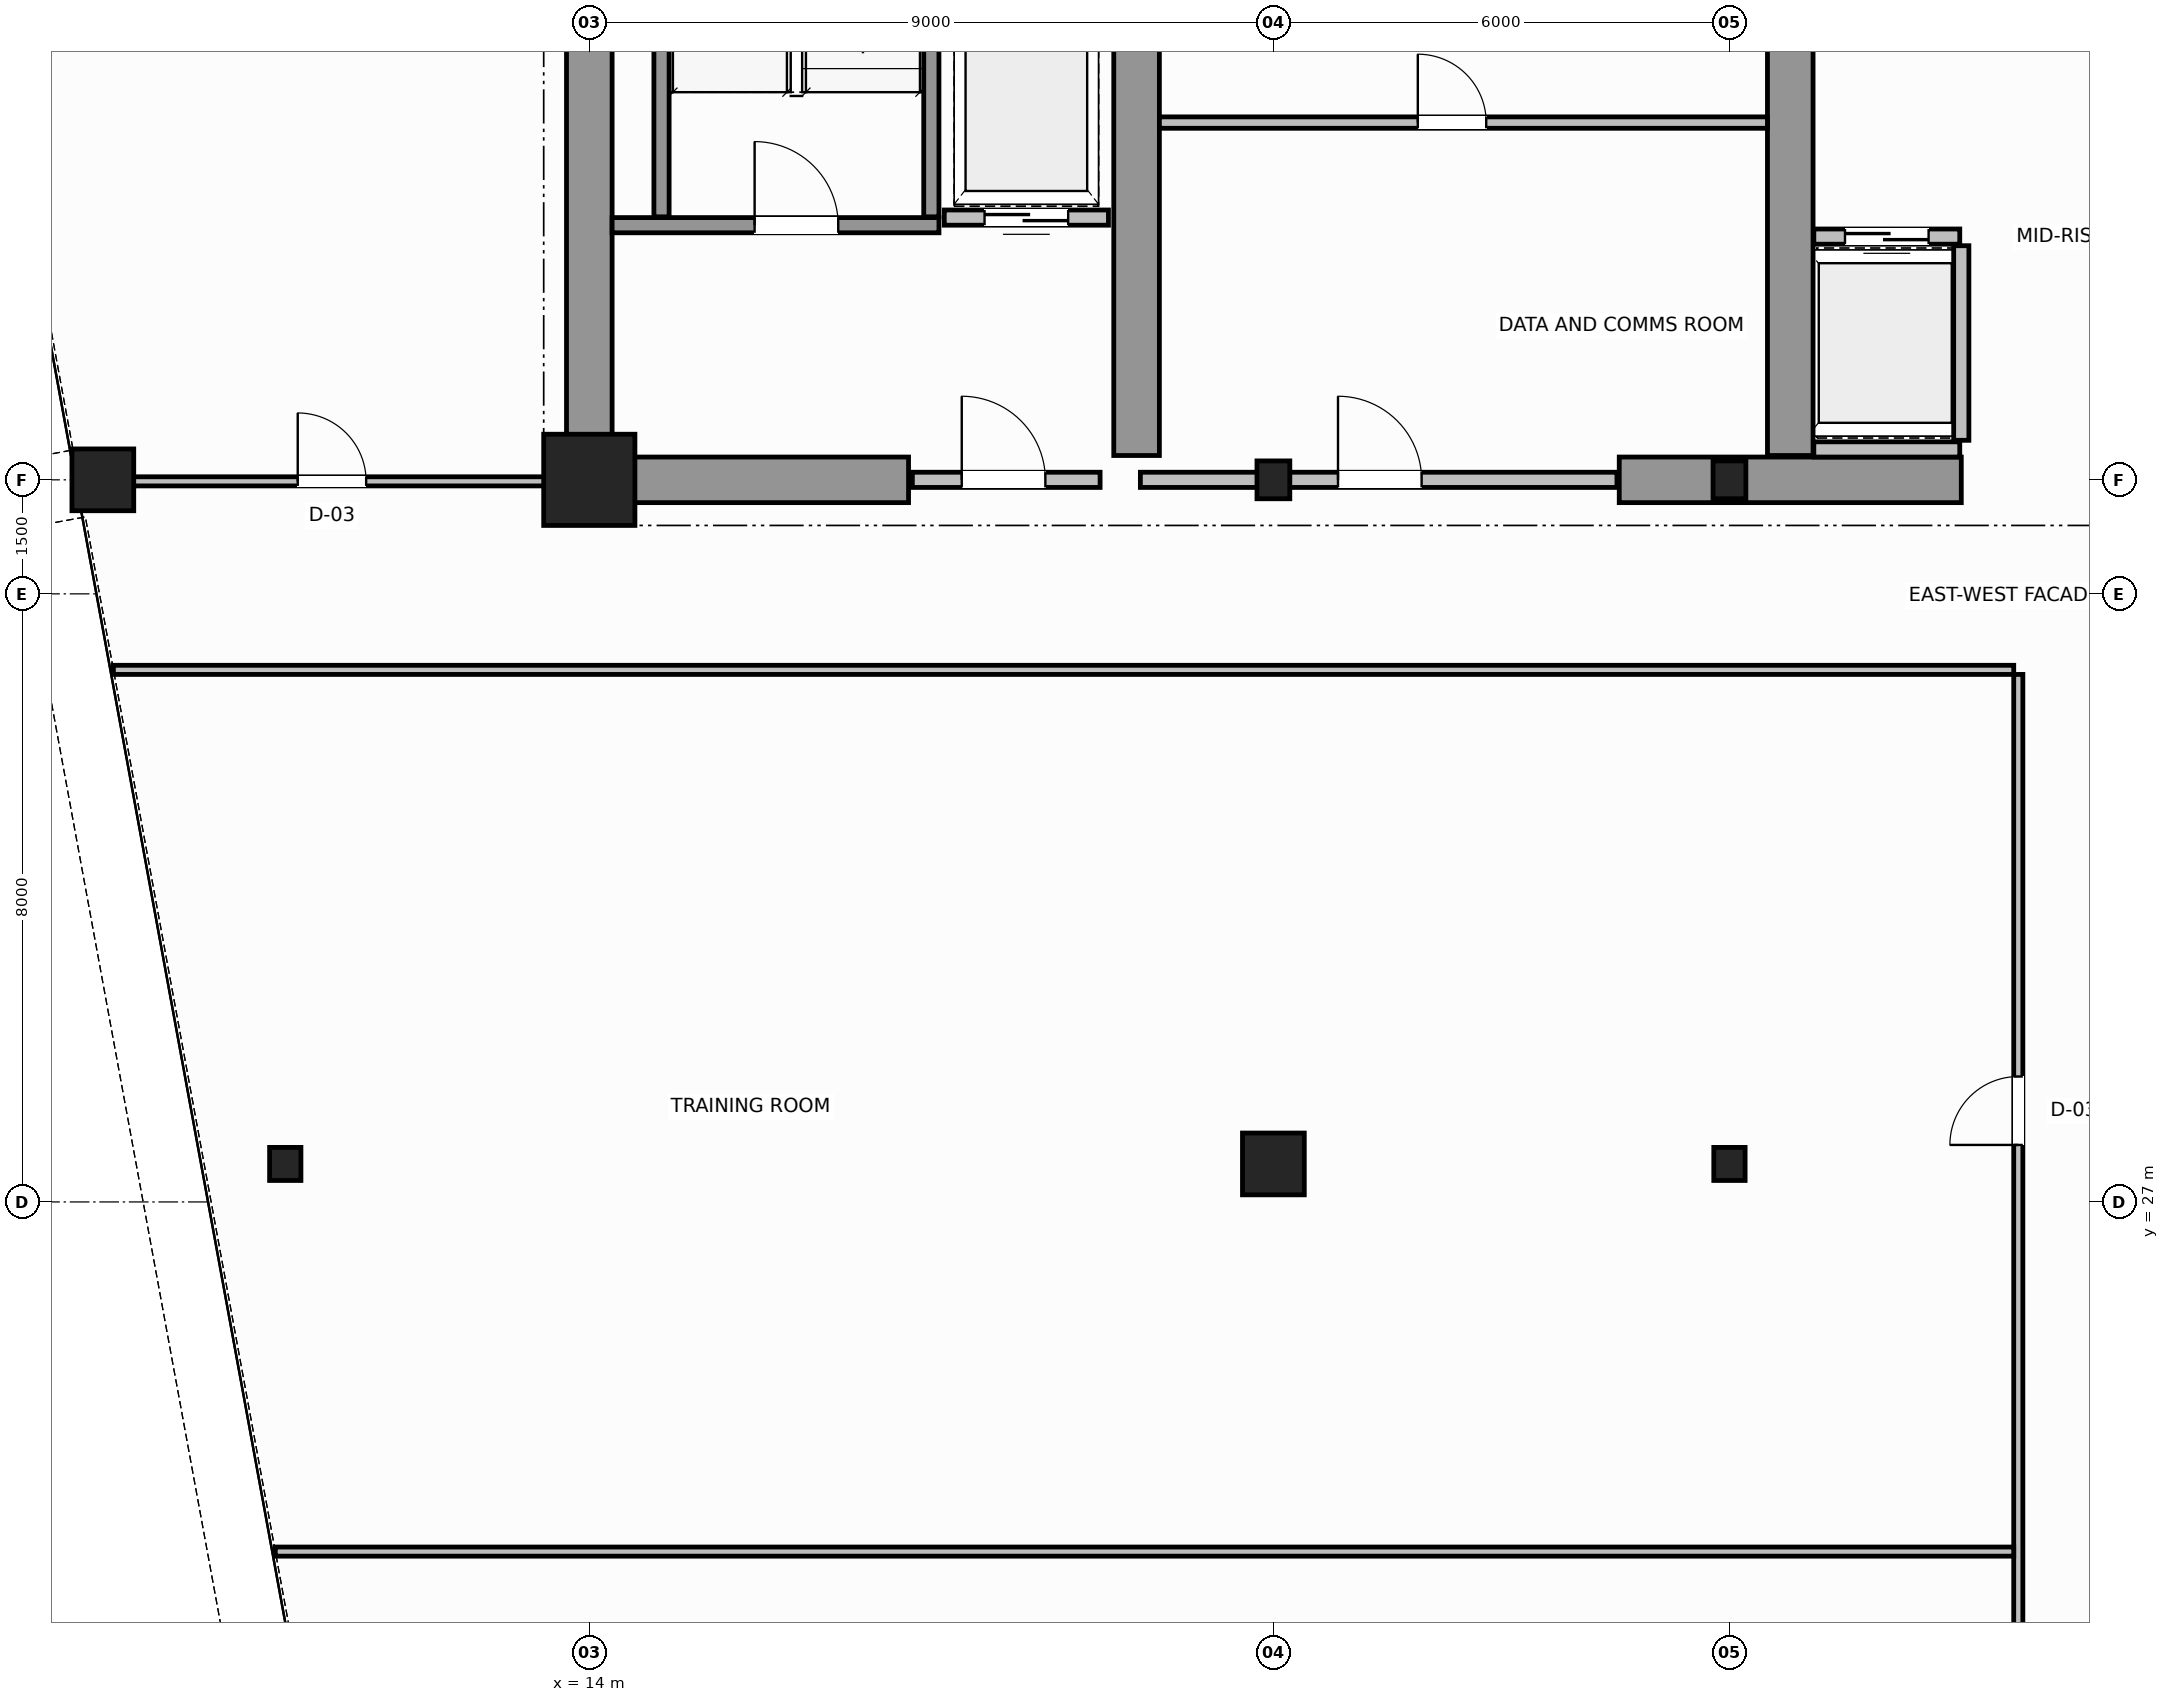
"""IFC4 building model, lengths in metres.
Left out: names, types, materials, properties, quantities, classifications, styles, units other than length and angle.
Written with IfcOpenShell. Run it as: python <this file> out.ifc"""

import sys

from ifc_helpers import new_model, si_unit, direction, frame, frame_2d, origin, origin_2d, place, context, subcontext, project, spatial, rectangle, hollow_circle, i_section, extrude, source, transform, mapped, element, fill, save


model = new_model("IFC4")
c1 = context("Model", 3, precision=1e-05, world=origin(), true_north=direction((0.0, 1.0)))
c2 = subcontext(c1, "Body", "Model", "MODEL_VIEW")
j1 = project(units=[si_unit("LENGTHUNIT", "METRE"), si_unit("PLANEANGLEUNIT", "RADIAN")], contexts=[c1])
p1 = place(None, origin())
s1 = spatial("IfcSite", under=j1, at=p1, CompositionType="ELEMENT")
p2 = place(p1, origin())
s2 = spatial("IfcBuilding", under=s1, at=p2, CompositionType="ELEMENT")
p3 = place(p2, frame((0.0, 0.0, 191.8)))
s3 = spatial("IfcBuildingStorey", under=s2, at=p3, CompositionType="ELEMENT", Elevation=191.8)
m1 = source(origin(), c2, "Body", "SweptSolid", [
    extrude(rectangle(XDim=1.2, YDim=1.2, at=origin_2d()), origin(), (0.0, 0.0, 1.0), 3.8),
])
p4 = place(p3, frame((14.0, 36.5, 0.0), z_axis=(0.0, 0.0, 1.0), x_axis=(1.0, 0.0, 0.0)))
e1 = element("IfcColumn", 1, at=p4, inside=s3, PredefinedType="COLUMN", context=c2, shape_type="MappedRepresentation", body=[
    mapped(m1, transform((0.0, 0.0, 0.0), scale=1.0)),
])
m2 = source(origin(), c2, "Body", "SweptSolid", [
    extrude(i_section(OverallWidth=0.432, OverallDepth=0.498, WebThickness=0.055, FlangeThickness=0.068, FilletRadius=0.015, at=origin_2d()), origin(), (0.0, 0.0, 1.0), 3.8),
])
for number, where, z_axis, x_axis in (
    (2, (23.0, 36.5, 0.0), (0.0, 0.0, 1.0), (1.0, 0.0, 0.0)),
    (3, (29.0, 36.5, 0.0), (0.0, 0.0, 1.0), (1.0, 0.0, 0.0)),
):
    element("IfcColumn", number, at=place(p3, frame(where, z_axis=z_axis, x_axis=x_axis)), inside=s3, PredefinedType="COLUMN", context=c2, shape_type="MappedRepresentation", body=[
        mapped(m2, transform((0.0, 0.0, 0.0), scale=1.0)),
    ])
m3 = source(origin(), c2, "Body", "SweptSolid", [
    extrude(hollow_circle(Radius=0.406, WallThickness=0.04, at=origin_2d()), origin(), (0.0, 0.0, 1.0), 3.8),
])
p5 = place(p3, frame((7.6, 36.5, 0.0), z_axis=(0.0, 0.0, 1.0), x_axis=(1.0, 0.0, 0.0)))
e4 = element("IfcColumn", 4, at=p5, inside=s3, PredefinedType="COLUMN", context=c2, shape_type="MappedRepresentation", body=[
    mapped(m3, transform((0.0, 0.0, 0.0), scale=1.0)),
])
m4 = source(origin(), c2, "Body", "SweptSolid", [
    extrude(i_section(OverallWidth=0.412, OverallDepth=0.435, WebThickness=0.036, FlangeThickness=0.05, FilletRadius=0.015, at=origin_2d()), origin(), (0.0, 0.0, 1.0), 3.8),
])
p6 = place(p3, frame((10.0, 27.5, 0.0), z_axis=(0.0, 0.0, 1.0), x_axis=(1.0, 0.0, 0.0)))
e5 = element("IfcColumn", 5, at=p6, inside=s3, PredefinedType="COLUMN", context=c2, shape_type="MappedRepresentation", body=[
    mapped(m4, transform((0.0, 0.0, 0.0), scale=1.0)),
])
p7 = place(p3, frame((23.0, 27.5, 0.0), z_axis=(0.0, 0.0, 1.0), x_axis=(1.0, 0.0, 0.0)))
e6 = element("IfcColumn", 6, at=p7, inside=s3, PredefinedType="COLUMN", context=c2, shape_type="MappedRepresentation", body=[
    mapped(m3, transform((0.0, 0.0, 0.0), scale=1.0)),
])
m5 = source(origin(), c2, "Body", "SweptSolid", [
    extrude(i_section(OverallWidth=0.412, OverallDepth=0.435, WebThickness=0.036, FlangeThickness=0.05, FilletRadius=0.015, at=origin_2d()), origin(), (0.0, 0.0, 1.0), 3.8),
])
p8 = place(p3, frame((29.0, 27.5, 0.0), z_axis=(0.0, 0.0, 1.0), x_axis=(1.0, 0.0, 0.0)))
e7 = element("IfcColumn", 7, at=p8, inside=s3, PredefinedType="COLUMN", context=c2, shape_type="MappedRepresentation", body=[
    mapped(m5, transform((0.0, 0.0, 0.0), scale=1.0)),
])
p9 = place(p3, frame((14.0, 36.5, 0.0), z_axis=(0.0, 0.0, 1.0), x_axis=(0.0, 1.0, 0.0)))
e8 = element("IfcWall", 8, at=p9, inside=s3, PredefinedType="SHEAR", context=c2, shape_type="SweptSolid", body=[
    extrude(rectangle(XDim=14.5, YDim=0.6, at=frame_2d((7.25, 0.0))), origin(), (0.0, 0.0, 1.0), 3.8),
])
p10 = place(p3, frame((14.32, 36.5, 0.0), z_axis=(0.0, 0.0, 1.0), x_axis=(1.0, 0.0, 0.0)))
e9 = element("IfcWall", 9, at=p10, inside=s3, PredefinedType="SHEAR", context=c2, shape_type="SweptSolid", body=[
    extrude(rectangle(XDim=3.88, YDim=0.6, at=frame_2d((1.94, 0.0))), origin(), (0.0, 0.0, 1.0), 2.58),
])
p11 = place(p3, frame((27.55, 36.5, 0.0), z_axis=(0.0, 0.0, 1.0), x_axis=(1.0, 0.0, 0.0)))
e10 = element("IfcWall", 10, at=p11, inside=s3, PredefinedType="SHEAR", context=c2, shape_type="SweptSolid", body=[
    extrude(rectangle(XDim=4.5, YDim=0.6, at=frame_2d((2.25, 0.0))), origin(), (0.0, 0.0, 1.0), 3.8),
])
for number, where, z_axis, x_axis in (
    (11, (21.2, 36.82, 0.0), (0.0, 0.0, 1.0), (0.0, 1.0, 0.0)),
    (12, (29.8, 36.82, 0.0), (0.0, 0.0, 1.0), (0.0, 1.0, 0.0)),
):
    element("IfcWall", number, at=place(p3, frame(where, z_axis=z_axis, x_axis=x_axis)), inside=s3, PredefinedType="SHEAR", context=c2, shape_type="SweptSolid", body=[
        extrude(rectangle(XDim=9.38, YDim=0.6, at=frame_2d((4.69, 0.0))), origin(), (0.0, 0.0, 1.0), 3.8),
    ])
p12 = place(p3, frame((14.3, 39.85, 0.0), z_axis=(0.0, 0.0, 1.0), x_axis=(1.0, 0.0, 0.0)))
e13 = element("IfcWall", 13, at=p12, inside=s3, PredefinedType="SOLIDWALL", context=c2, shape_type="SweptSolid", body=[
    extrude(rectangle(XDim=4.3, YDim=0.2, at=frame_2d((2.15, 0.0))), origin(), (0.0, 0.0, 1.0), 3.8),
])
p13 = place(p12, frame((1.875, 0.0, 0.0)))
e14 = element("IfcOpeningElement", 14, at=p13, cuts=e13, PredefinedType="OPENING", context=c2, shape_type="SweptSolid", body=[
    extrude(rectangle(XDim=1.1, YDim=2.15, at=frame_2d((0.55, 1.075))), frame((0.0, 0.11, 0.0), z_axis=(0.0, -1.0, 0.0), x_axis=(1.0, 0.0, 0.0)), (0.0, 0.0, 1.0), 0.22),
])
for number, where, z_axis, x_axis in (
    (15, (14.95, 39.96, 0.0), (0.0, 0.0, 1.0), (0.0, 1.0, 0.0)),
    (16, (18.5, 39.96, 0.0), (0.0, 0.0, 1.0), (0.0, 1.0, 0.0)),
):
    element("IfcWall", number, at=place(p3, frame(where, z_axis=z_axis, x_axis=x_axis)), inside=s3, PredefinedType="SOLIDWALL", context=c2, shape_type="SweptSolid", body=[
        extrude(rectangle(XDim=9.93, YDim=0.2, at=frame_2d((4.965, 0.0))), origin(), (0.0, 0.0, 1.0), 3.8),
    ])
p14 = place(p3, frame((18.25, 36.5, 0.0), z_axis=(0.0, 0.0, 1.0), x_axis=(1.0, 0.0, 0.0)))
e17 = element("IfcWall", 17, at=p14, inside=s3, PredefinedType="SOLIDWALL", context=c2, shape_type="SweptSolid", body=[
    extrude(rectangle(XDim=2.47, YDim=0.2, at=frame_2d((1.235, 0.0))), origin(), (0.0, 0.0, 1.0), 2.57),
])
p15 = place(p14, frame((0.65, 0.0, 0.0)))
e18 = element("IfcOpeningElement", 18, at=p15, cuts=e17, PredefinedType="OPENING", context=c2, shape_type="SweptSolid", body=[
    extrude(rectangle(XDim=1.1, YDim=2.15, at=frame_2d((0.55, 1.075))), frame((0.0, 0.11, 0.0), z_axis=(0.0, -1.0, 0.0), x_axis=(1.0, 0.0, 0.0)), (0.0, 0.0, 1.0), 0.22),
])
p16 = place(p3, frame((30.11, 39.7, 0.0), z_axis=(0.0, 0.0, 1.0), x_axis=(1.0, 0.0, 0.0)))
e19 = element("IfcWall", 19, at=p16, inside=s3, PredefinedType="SOLIDWALL", context=c2, shape_type="SweptSolid", body=[
    extrude(rectangle(XDim=1.92, YDim=0.2, at=frame_2d((0.96, 0.0))), origin(), (0.0, 0.0, 1.0), 3.58),
])
p17 = place(p16, frame((0.41, 0.0, 0.0)))
e20 = element("IfcOpeningElement", 20, at=p17, cuts=e19, PredefinedType="OPENING", context=c2, shape_type="SweptSolid", body=[
    extrude(rectangle(XDim=1.1, YDim=2.15, at=frame_2d((0.55, 1.075))), frame((0.0, 0.11, 0.0), z_axis=(0.0, -1.0, 0.0), x_axis=(1.0, 0.0, 0.0)), (0.0, 0.0, 1.0), 0.22),
])
p18 = place(p3, frame((30.11, 36.9, 0.0), z_axis=(0.0, 0.0, 1.0), x_axis=(1.0, 0.0, 0.0)))
e21 = element("IfcWall", 21, at=p18, inside=s3, PredefinedType="SOLIDWALL", context=c2, shape_type="SweptSolid", body=[
    extrude(rectangle(XDim=1.92, YDim=0.2, at=frame_2d((0.96, 0.0))), origin(), (0.0, 0.0, 1.0), 3.58),
])
p19 = place(p3, frame((32.05, 37.02, 0.0), z_axis=(0.0, 0.0, 1.0), x_axis=(0.0, 1.0, 0.0)))
e22 = element("IfcWall", 22, at=p19, inside=s3, PredefinedType="SOLIDWALL", context=c2, shape_type="SweptSolid", body=[
    extrude(rectangle(XDim=2.56, YDim=0.2, at=frame_2d((1.28, 0.0))), origin(), (0.0, 0.0, 1.0), 3.58),
])
p20 = place(p3, frame((18.67, 39.95, 0.0), z_axis=(0.0, 0.0, 1.0), x_axis=(1.0, 0.0, 0.0)))
e23 = element("IfcWall", 23, at=p20, inside=s3, PredefinedType="SOLIDWALL", context=c2, shape_type="SweptSolid", body=[
    extrude(rectangle(XDim=2.16, YDim=0.2, at=frame_2d((1.08, 0.0))), origin(), (0.0, 0.0, 1.0), 3.58),
])
p21 = place(p20, frame((0.53, 0.0, 0.0)))
e24 = element("IfcOpeningElement", 24, at=p21, cuts=e23, PredefinedType="OPENING", context=c2, shape_type="SweptSolid", body=[
    extrude(rectangle(XDim=1.1, YDim=2.15, at=frame_2d((0.55, 1.075))), frame((0.0, 0.11, 0.0), z_axis=(0.0, -1.0, 0.0), x_axis=(1.0, 0.0, 0.0)), (0.0, 0.0, 1.0), 0.22),
])
p22 = place(p3, frame((21.25, 36.5, 0.0), z_axis=(0.0, 0.0, 1.0), x_axis=(1.0, 0.0, 0.0)))
e25 = element("IfcWall", 25, at=p22, inside=s3, PredefinedType="SOLIDWALL", context=c2, shape_type="SweptSolid", body=[
    extrude(rectangle(XDim=6.27, YDim=0.2, at=frame_2d((3.135, 0.0))), origin(), (0.0, 0.0, 1.0), 2.57),
])
p23 = place(p22, frame((2.6, 0.0, 0.0)))
e26 = element("IfcOpeningElement", 26, at=p23, cuts=e25, PredefinedType="OPENING", context=c2, shape_type="SweptSolid", body=[
    extrude(rectangle(XDim=1.1, YDim=2.15, at=frame_2d((0.55, 1.075))), frame((0.0, 0.11, 0.0), z_axis=(0.0, -1.0, 0.0), x_axis=(1.0, 0.0, 0.0)), (0.0, 0.0, 1.0), 0.22),
])
p24 = place(p3, frame((21.5, 41.2, 0.0), z_axis=(0.0, 0.0, 1.0), x_axis=(1.0, 0.0, 0.0)))
e27 = element("IfcWall", 27, at=p24, inside=s3, PredefinedType="PARTITIONING", context=c2, shape_type="SweptSolid", body=[
    extrude(rectangle(XDim=8.0, YDim=0.15, at=frame_2d((4.0, 0.0))), origin(), (0.0, 0.0, 1.0), 3.58),
])
p25 = place(p24, frame((3.4, 0.0, 0.0)))
e28 = element("IfcOpeningElement", 28, at=p25, cuts=e27, PredefinedType="OPENING", context=c2, shape_type="SweptSolid", body=[
    extrude(rectangle(XDim=0.9, YDim=2.1, at=frame_2d((0.45, 1.05))), frame((0.0, 0.085, 0.0), z_axis=(0.0, -1.0, 0.0), x_axis=(1.0, 0.0, 0.0)), (0.0, 0.0, 1.0), 0.17),
])
p26 = place(p3, frame((7.739, 34.0, 0.0), z_axis=(0.0, 0.0, 1.0), x_axis=(1.0, 0.0, 0.0)))
e29 = element("IfcWall", 29, at=p26, inside=s3, PredefinedType="PARTITIONING", context=c2, shape_type="SweptSolid", body=[
    extrude(rectangle(XDim=25.001, YDim=0.12, at=frame_2d((12.5, 0.0))), origin(), (0.0, 0.0, 1.0), 3.58),
])
p27 = place(p3, frame((32.8, 15.2, 0.0), z_axis=(0.0, 0.0, 1.0), x_axis=(0.0, 1.0, 0.0)))
e30 = element("IfcWall", 30, at=p27, inside=s3, PredefinedType="PARTITIONING", context=c2, shape_type="SweptSolid", body=[
    extrude(rectangle(XDim=18.74, YDim=0.12, at=frame_2d((9.37, 0.0))), origin(), (0.0, 0.0, 1.0), 3.58),
])
p28 = place(p27, frame((3.15, 0.0, 0.0)))
e31 = element("IfcOpeningElement", 31, at=p28, cuts=e30, PredefinedType="OPENING", context=c2, shape_type="SweptSolid", body=[
    extrude(rectangle(XDim=0.9, YDim=2.15, at=frame_2d((0.45, 1.075))), frame((0.0, 0.07, 0.0), z_axis=(0.0, -1.0, 0.0), x_axis=(1.0, 0.0, 0.0)), (0.0, 0.0, 1.0), 0.14),
])
p29 = place(p27, frame((12.55, 0.0, 0.0)))
e32 = element("IfcOpeningElement", 32, at=p29, cuts=e30, PredefinedType="OPENING", context=c2, shape_type="SweptSolid", body=[
    extrude(rectangle(XDim=0.9, YDim=2.15, at=frame_2d((0.45, 1.075))), frame((0.0, 0.07, 0.0), z_axis=(0.0, -1.0, 0.0), x_axis=(1.0, 0.0, 0.0)), (0.0, 0.0, 1.0), 0.14),
])
p30 = place(p3, frame((7.289, 36.48, 0.0), z_axis=(0.0, 0.0, 1.0), x_axis=(1.0, 0.0, 0.0)))
e33 = element("IfcWall", 33, at=p30, inside=s3, PredefinedType="PARTITIONING", context=c2, shape_type="SweptSolid", body=[
    extrude(rectangle(XDim=6.651, YDim=0.12, at=frame_2d((3.325, 0.0))), origin(), (0.0, 0.0, 1.0), 2.97),
])
p31 = place(p30, frame((2.875, 0.0, 0.0)))
e34 = element("IfcOpeningElement", 34, at=p31, cuts=e33, PredefinedType="OPENING", context=c2, shape_type="SweptSolid", body=[
    extrude(rectangle(XDim=0.9, YDim=2.15, at=frame_2d((0.45, 1.075))), frame((0.0, 0.07, 0.0), z_axis=(0.0, -1.0, 0.0), x_axis=(1.0, 0.0, 0.0)), (0.0, 0.0, 1.0), 0.14),
])
p32 = place(p3, frame((9.869, 22.4, 0.0), z_axis=(0.0, 0.0, 1.0), x_axis=(1.0, 0.0, 0.0)))
e35 = element("IfcWall", 35, at=p32, inside=s3, PredefinedType="PARTITIONING", context=c2, shape_type="SweptSolid", body=[
    extrude(rectangle(XDim=22.871, YDim=0.12, at=frame_2d((11.436, 0.0))), origin(), (0.0, 0.0, 1.0), 3.58),
])
m6 = source(origin(), c2, "Body", "SweptSolid", [
    extrude(rectangle(XDim=1.1, YDim=2.15, at=frame_2d((0.55, 1.075))), frame((0.0, 0.025, 0.0), z_axis=(0.0, -1.0, 0.0), x_axis=(1.0, 0.0, 0.0)), (0.0, 0.0, 1.0), 0.05),
])
p33 = place(p13, origin())
e36 = element("IfcDoor", 36, at=p33, inside=s3, OperationType="SINGLE_SWING_LEFT", PredefinedType="DOOR", context=c2, shape_type="MappedRepresentation", body=[
    mapped(m6, transform((0.0, 0.0, 0.0), scale=1.0)),
])
fill(e14, e36)
p34 = place(p15, origin())
e37 = element("IfcDoor", 37, at=p34, inside=s3, OperationType="SINGLE_SWING_RIGHT", PredefinedType="DOOR", context=c2, shape_type="MappedRepresentation", body=[
    mapped(m6, transform((0.0, 0.0, 0.0), scale=1.0)),
])
fill(e18, e37)
p35 = place(p17, origin())
e38 = element("IfcDoor", 38, at=p35, inside=s3, OperationType="DOUBLE_DOOR_SLIDING", PredefinedType="DOOR", context=c2, shape_type="MappedRepresentation", body=[
    mapped(m6, transform((0.0, 0.0, 0.0), scale=1.0)),
])
fill(e20, e38)
p36 = place(p21, origin())
e39 = element("IfcDoor", 39, at=p36, inside=s3, OperationType="DOUBLE_DOOR_SLIDING", PredefinedType="DOOR", context=c2, shape_type="MappedRepresentation", body=[
    mapped(m6, transform((0.0, 0.0, 0.0), scale=1.0)),
])
fill(e24, e39)
p37 = place(p23, origin())
e40 = element("IfcDoor", 40, at=p37, inside=s3, OperationType="SINGLE_SWING_LEFT", PredefinedType="DOOR", context=c2, shape_type="MappedRepresentation", body=[
    mapped(m6, transform((0.0, 0.0, 0.0), scale=1.0)),
])
fill(e26, e40)
m7 = source(origin(), c2, "Body", "SweptSolid", [
    extrude(rectangle(XDim=0.9, YDim=2.1, at=frame_2d((0.45, 1.05))), frame((0.0, 0.025, 0.0), z_axis=(0.0, -1.0, 0.0), x_axis=(1.0, 0.0, 0.0)), (0.0, 0.0, 1.0), 0.05),
])
p38 = place(p25, origin())
e41 = element("IfcDoor", 41, at=p38, inside=s3, OperationType="SINGLE_SWING_RIGHT", PredefinedType="DOOR", context=c2, shape_type="MappedRepresentation", body=[
    mapped(m7, transform((0.0, 0.0, 0.0), scale=1.0)),
])
fill(e28, e41)
m8 = source(origin(), c2, "Body", "SweptSolid", [
    extrude(rectangle(XDim=0.9, YDim=2.15, at=frame_2d((0.45, 1.075))), frame((0.0, 0.025, 0.0), z_axis=(0.0, -1.0, 0.0), x_axis=(1.0, 0.0, 0.0)), (0.0, 0.0, 1.0), 0.05),
])
p39 = place(p31, origin())
e42 = element("IfcDoor", 42, at=p39, inside=s3, OperationType="SINGLE_SWING_LEFT", PredefinedType="DOOR", context=c2, shape_type="MappedRepresentation", body=[
    mapped(m8, transform((0.0, 0.0, 0.0), scale=1.0)),
])
fill(e34, e42)
p40 = place(p29, origin())
e43 = element("IfcDoor", 43, at=p40, inside=s3, OperationType="SINGLE_SWING_RIGHT", PredefinedType="DOOR", context=c2, shape_type="MappedRepresentation", body=[
    mapped(m8, transform((0.0, 0.0, 0.0), scale=1.0)),
])
fill(e32, e43)
save(model, sys.argv[1])
